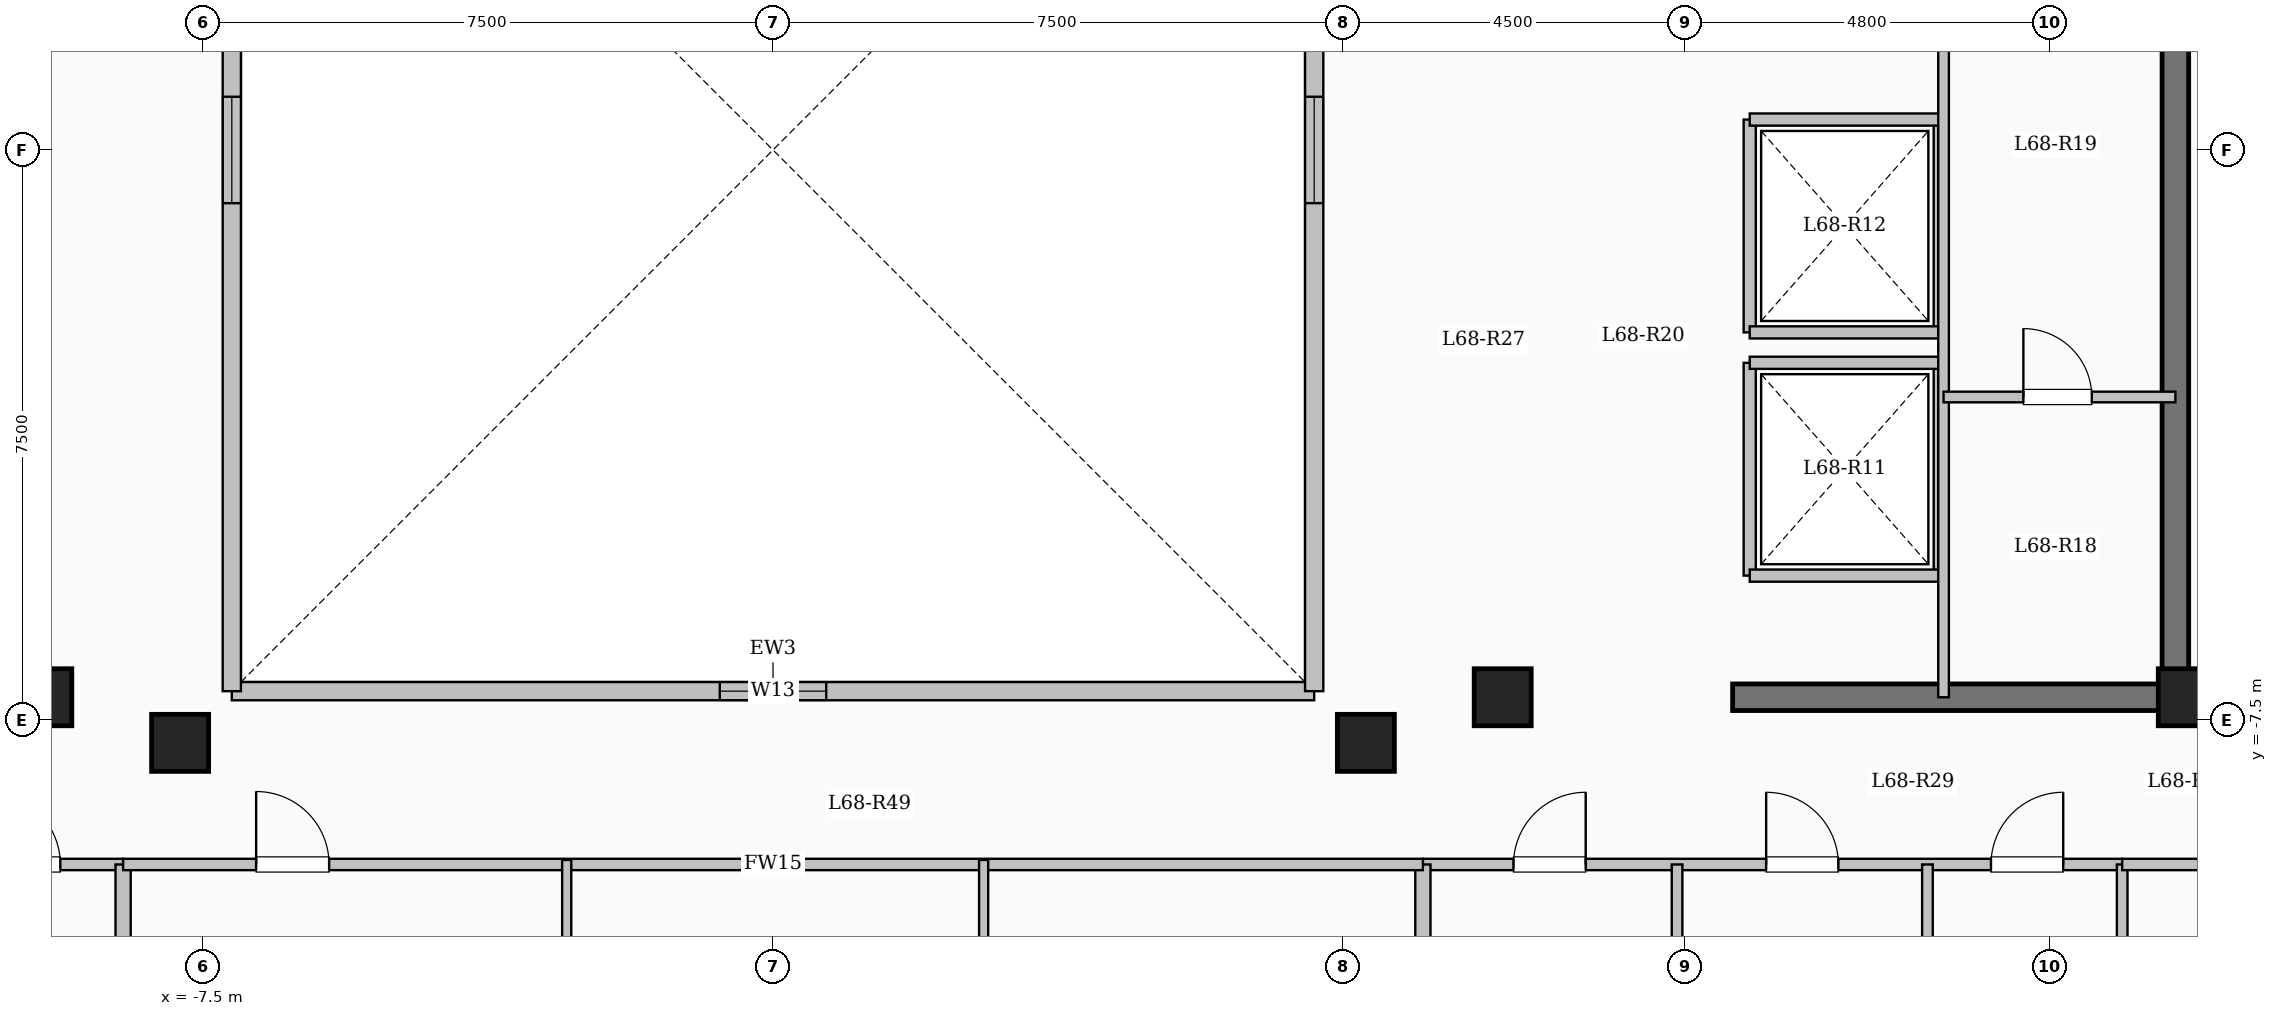
"""IFC4 building model, lengths in metres.
Left out: names, types, materials, properties, quantities, classifications, styles, units other than length and angle.
Written with IfcOpenShell. Run it as: python <this file> out.ifc"""

import sys

from ifc_helpers import new_model, si_unit, direction, frame, frame_2d, origin, origin_2d, place, context, subcontext, project, spatial, rectangle, extrude, element, fill, save


model = new_model("IFC4")
c1 = context("Model", 3, precision=1e-05, world=origin(), true_north=direction((0.0, 1.0)))
c2 = subcontext(c1, "Body", "Model", "MODEL_VIEW")
j1 = project(units=[si_unit("LENGTHUNIT", "METRE"), si_unit("PLANEANGLEUNIT", "RADIAN")], contexts=[c1])
p1 = place(None, origin())
s1 = spatial("IfcSite", under=j1, at=p1, CompositionType="ELEMENT")
p2 = place(p1, origin())
s2 = spatial("IfcBuilding", under=s1, at=p2, CompositionType="ELEMENT")
p3 = place(p2, frame((0.0, 0.0, 251.55)))
s3 = spatial("IfcBuildingStorey", under=s2, at=p3, CompositionType="ELEMENT", Elevation=251.55)
for number, where, z_axis, x_axis in (
    (1, (-7.8, -7.8, 0.0), (0.0, 0.0, 1.0), (1.0, 0.0, 0.0)),
    (2, (7.8, -7.8, 0.0), (0.0, 0.0, 1.0), (1.0, 0.0, 0.0)),
    (3, (-9.6, -7.2, 0.0), (0.0, 0.0, 1.0), (1.0, 0.0, 0.0)),
    (4, (9.6, -7.2, 0.0), (0.0, 0.0, 1.0), (1.0, 0.0, 0.0)),
    (5, (18.6, -7.2, 0.0), (0.0, 0.0, 1.0), (1.0, 0.0, 0.0)),
):
    element("IfcColumn", number, at=place(p3, frame(where, z_axis=z_axis, x_axis=x_axis)), inside=s3, PredefinedType="COLUMN", context=c2, shape_type="SweptSolid", body=[
        extrude(rectangle(XDim=0.75, YDim=0.75, at=origin_2d()), origin(), (0.0, 0.0, 1.0), 3.35),
    ])
p4 = place(p3, frame((-7.12, -7.12, 0.0), z_axis=(0.0, 0.0, 1.0), x_axis=(1.0, 0.0, 0.0)))
e6 = element("IfcWall", 6, at=p4, inside=s3, PredefinedType="SOLIDWALL", context=c2, shape_type="SweptSolid", body=[
    extrude(rectangle(XDim=14.24, YDim=0.24, at=frame_2d((7.12, 0.0))), origin(), (0.0, 0.0, 1.0), 3.1),
])
p5 = place(p4, frame((6.42, 0.0, 0.95)))
e7 = element("IfcOpeningElement", 7, at=p5, cuts=e6, PredefinedType="OPENING", context=c2, shape_type="SweptSolid", body=[
    extrude(rectangle(XDim=1.4, YDim=1.5, at=frame_2d((0.7, 0.75))), frame((0.0, 0.13, 0.0), z_axis=(0.0, -1.0, 0.0), x_axis=(1.0, 0.0, 0.0)), (0.0, 0.0, 1.0), 0.26),
])
p6 = place(p3, frame((7.12, -7.12, 0.0), z_axis=(0.0, 0.0, 1.0), x_axis=(0.0, 1.0, 0.0)))
e8 = element("IfcWall", 8, at=p6, inside=s3, PredefinedType="SOLIDWALL", context=c2, shape_type="SweptSolid", body=[
    extrude(rectangle(XDim=14.24, YDim=0.24, at=frame_2d((7.12, 0.0))), origin(), (0.0, 0.0, 1.0), 3.1),
])
p7 = place(p6, frame((6.42, 0.0, 0.95)))
e9 = element("IfcOpeningElement", 9, at=p7, cuts=e8, PredefinedType="OPENING", context=c2, shape_type="SweptSolid", body=[
    extrude(rectangle(XDim=1.4, YDim=1.5, at=frame_2d((0.7, 0.75))), frame((0.0, 0.13, 0.0), z_axis=(0.0, -1.0, 0.0), x_axis=(1.0, 0.0, 0.0)), (0.0, 0.0, 1.0), 0.26),
])
p8 = place(p3, frame((-7.12, 7.12, 0.0), z_axis=(0.0, 0.0, 1.0), x_axis=(0.0, -1.0, 0.0)))
e10 = element("IfcWall", 10, at=p8, inside=s3, PredefinedType="SOLIDWALL", context=c2, shape_type="SweptSolid", body=[
    extrude(rectangle(XDim=14.24, YDim=0.24, at=frame_2d((7.12, 0.0))), origin(), (0.0, 0.0, 1.0), 3.1),
])
p9 = place(p8, frame((6.42, 0.0, 0.95)))
e11 = element("IfcOpeningElement", 11, at=p9, cuts=e10, PredefinedType="OPENING", context=c2, shape_type="SweptSolid", body=[
    extrude(rectangle(XDim=1.4, YDim=1.5, at=frame_2d((0.7, 0.75))), frame((0.0, 0.13, 0.0), z_axis=(0.0, -1.0, 0.0), x_axis=(1.0, 0.0, 0.0)), (0.0, 0.0, 1.0), 0.26),
])
for number, where, z_axis, x_axis in (
    (12, (12.85, -5.6, 0.0), (0.0, 0.0, 1.0), (0.0, 1.0, 0.0)),
    (13, (15.35, -5.6, 0.0), (0.0, 0.0, 1.0), (0.0, 1.0, 0.0)),
):
    element("IfcWall", number, at=place(p3, frame(where, z_axis=z_axis, x_axis=x_axis)), inside=s3, PredefinedType="SOLIDWALL", context=c2, shape_type="SweptSolid", body=[
        extrude(rectangle(XDim=2.8, YDim=0.16, at=frame_2d((1.4, 0.0))), origin(), (0.0, 0.0, 1.0), 3.1),
    ])
for number, where, z_axis, x_axis in (
    (14, (12.85, -5.6, 0.0), (0.0, 0.0, 1.0), (1.0, 0.0, 0.0)),
    (15, (12.85, -2.8, 0.0), (0.0, 0.0, 1.0), (1.0, 0.0, 0.0)),
):
    element("IfcWall", number, at=place(p3, frame(where, z_axis=z_axis, x_axis=x_axis)), inside=s3, PredefinedType="SOLIDWALL", context=c2, shape_type="SweptSolid", body=[
        extrude(rectangle(XDim=2.5, YDim=0.16, at=frame_2d((1.25, 0.0))), origin(), (0.0, 0.0, 1.0), 3.1),
    ])
for number, where, z_axis, x_axis in (
    (16, (12.85, -2.4, 0.0), (0.0, 0.0, 1.0), (0.0, 1.0, 0.0)),
    (17, (15.35, -2.4, 0.0), (0.0, 0.0, 1.0), (0.0, 1.0, 0.0)),
):
    element("IfcWall", number, at=place(p3, frame(where, z_axis=z_axis, x_axis=x_axis)), inside=s3, PredefinedType="SOLIDWALL", context=c2, shape_type="SweptSolid", body=[
        extrude(rectangle(XDim=2.8, YDim=0.16, at=frame_2d((1.4, 0.0))), origin(), (0.0, 0.0, 1.0), 3.1),
    ])
for number, where, z_axis, x_axis in (
    (18, (12.85, -2.4, 0.0), (0.0, 0.0, 1.0), (1.0, 0.0, 0.0)),
    (19, (12.85, 0.4, 0.0), (0.0, 0.0, 1.0), (1.0, 0.0, 0.0)),
):
    element("IfcWall", number, at=place(p3, frame(where, z_axis=z_axis, x_axis=x_axis)), inside=s3, PredefinedType="SOLIDWALL", context=c2, shape_type="SweptSolid", body=[
        extrude(rectangle(XDim=2.5, YDim=0.16, at=frame_2d((1.25, 0.0))), origin(), (0.0, 0.0, 1.0), 3.1),
    ])
p10 = place(p3, frame((18.45, -7.375, 0.0), z_axis=(0.0, 0.0, 1.0), x_axis=(0.0, 1.0, 0.0)))
e20 = element("IfcWall", 20, at=p10, inside=s3, PredefinedType="SHEAR", context=c2, shape_type="SweptSolid", body=[
    extrude(rectangle(XDim=14.05, YDim=0.35, at=frame_2d((7.025, 0.0))), origin(), (0.0, 0.0, 1.0), 3.35),
])
p11 = place(p3, frame((12.625, -7.2, 0.0), z_axis=(0.0, 0.0, 1.0), x_axis=(1.0, 0.0, 0.0)))
e21 = element("IfcWall", 21, at=p11, inside=s3, PredefinedType="SHEAR", context=c2, shape_type="SweptSolid", body=[
    extrude(rectangle(XDim=6.0, YDim=0.35, at=frame_2d((3.0, 0.0))), origin(), (0.0, 0.0, 1.0), 3.35),
])
p12 = place(p3, frame((15.4, -7.2, 0.0), z_axis=(0.0, 0.0, 1.0), x_axis=(0.0, 1.0, 0.0)))
e22 = element("IfcWall", 22, at=p12, inside=s3, PredefinedType="PARTITIONING", context=c2, shape_type="SweptSolid", body=[
    extrude(rectangle(XDim=10.45, YDim=0.14, at=frame_2d((5.225, 0.0))), origin(), (0.0, 0.0, 1.0), 3.1),
])
p13 = place(p12, frame((9.25, 0.0, 0.0)))
e23 = element("IfcOpeningElement", 23, at=p13, cuts=e22, PredefinedType="OPENING", context=c2, shape_type="SweptSolid", body=[
    extrude(rectangle(XDim=0.9, YDim=2.08, at=frame_2d((0.45, 1.04))), frame((0.0, 0.08, 0.0), z_axis=(0.0, -1.0, 0.0), x_axis=(1.0, 0.0, 0.0)), (0.0, 0.0, 1.0), 0.16),
])
p14 = place(p3, frame((15.4, -3.25, 0.0), z_axis=(0.0, 0.0, 1.0), x_axis=(1.0, 0.0, 0.0)))
e24 = element("IfcWall", 24, at=p14, inside=s3, PredefinedType="PARTITIONING", context=c2, shape_type="SweptSolid", body=[
    extrude(rectangle(XDim=3.05, YDim=0.14, at=frame_2d((1.525, 0.0))), origin(), (0.0, 0.0, 1.0), 3.1),
])
p15 = place(p14, frame((1.05, 0.0, 0.0)))
e25 = element("IfcOpeningElement", 25, at=p15, cuts=e24, PredefinedType="OPENING", context=c2, shape_type="SweptSolid", body=[
    extrude(rectangle(XDim=0.9, YDim=2.08, at=frame_2d((0.45, 1.04))), frame((0.0, 0.08, 0.0), z_axis=(0.0, -1.0, 0.0), x_axis=(1.0, 0.0, 0.0)), (0.0, 0.0, 1.0), 0.16),
])
p16 = place(p3, frame((-17.75, -9.4, 0.0), z_axis=(0.0, 0.0, 1.0), x_axis=(1.0, 0.0, 0.0)))
e26 = element("IfcWall", 26, at=p16, inside=s3, PredefinedType="PARTITIONING", context=c2, shape_type="SweptSolid", body=[
    extrude(rectangle(XDim=9.2, YDim=0.15, at=frame_2d((4.6, 0.0))), origin(), (0.0, 0.0, 1.0), 3.1),
])
p17 = place(p16, frame((1.142, 0.0, 0.0)))
e27 = element("IfcOpeningElement", 27, at=p17, cuts=e26, PredefinedType="OPENING", context=c2, shape_type="SweptSolid", body=[
    extrude(rectangle(XDim=0.95, YDim=2.15, at=frame_2d((0.475, 1.075))), frame((0.0, 0.085, 0.0), z_axis=(0.0, -1.0, 0.0), x_axis=(1.0, 0.0, 0.0)), (0.0, 0.0, 1.0), 0.17),
])
p18 = place(p16, frame((4.466, 0.0, 0.0)))
e28 = element("IfcOpeningElement", 28, at=p18, cuts=e26, PredefinedType="OPENING", context=c2, shape_type="SweptSolid", body=[
    extrude(rectangle(XDim=0.95, YDim=2.15, at=frame_2d((0.475, 1.075))), frame((0.0, 0.085, 0.0), z_axis=(0.0, -1.0, 0.0), x_axis=(1.0, 0.0, 0.0)), (0.0, 0.0, 1.0), 0.17),
])
p19 = place(p16, frame((7.424, 0.0, 0.0)))
e29 = element("IfcOpeningElement", 29, at=p19, cuts=e26, PredefinedType="OPENING", context=c2, shape_type="SweptSolid", body=[
    extrude(rectangle(XDim=0.95, YDim=2.15, at=frame_2d((0.475, 1.075))), frame((0.0, 0.085, 0.0), z_axis=(0.0, -1.0, 0.0), x_axis=(1.0, 0.0, 0.0)), (0.0, 0.0, 1.0), 0.17),
])
p20 = place(p3, frame((8.55, -9.4, 0.0), z_axis=(0.0, 0.0, 1.0), x_axis=(1.0, 0.0, 0.0)))
e30 = element("IfcWall", 30, at=p20, inside=s3, PredefinedType="PARTITIONING", context=c2, shape_type="SweptSolid", body=[
    extrude(rectangle(XDim=9.2, YDim=0.15, at=frame_2d((4.6, 0.0))), origin(), (0.0, 0.0, 1.0), 3.1),
])
p21 = place(p20, frame((1.192, 0.0, 0.0)))
e31 = element("IfcOpeningElement", 31, at=p21, cuts=e30, PredefinedType="OPENING", context=c2, shape_type="SweptSolid", body=[
    extrude(rectangle(XDim=0.95, YDim=2.15, at=frame_2d((0.475, 1.075))), frame((0.0, 0.085, 0.0), z_axis=(0.0, -1.0, 0.0), x_axis=(1.0, 0.0, 0.0)), (0.0, 0.0, 1.0), 0.17),
])
p22 = place(p20, frame((4.516, 0.0, 0.0)))
e32 = element("IfcOpeningElement", 32, at=p22, cuts=e30, PredefinedType="OPENING", context=c2, shape_type="SweptSolid", body=[
    extrude(rectangle(XDim=0.95, YDim=2.15, at=frame_2d((0.475, 1.075))), frame((0.0, 0.085, 0.0), z_axis=(0.0, -1.0, 0.0), x_axis=(1.0, 0.0, 0.0)), (0.0, 0.0, 1.0), 0.17),
])
p23 = place(p20, frame((7.474, 0.0, 0.0)))
e33 = element("IfcOpeningElement", 33, at=p23, cuts=e30, PredefinedType="OPENING", context=c2, shape_type="SweptSolid", body=[
    extrude(rectangle(XDim=0.95, YDim=2.15, at=frame_2d((0.475, 1.075))), frame((0.0, 0.085, 0.0), z_axis=(0.0, -1.0, 0.0), x_axis=(1.0, 0.0, 0.0)), (0.0, 0.0, 1.0), 0.17),
])
p24 = place(p3, frame((11.894, -20.85, 0.0), z_axis=(0.0, 0.0, 1.0), x_axis=(0.0, 1.0, 0.0)))
e34 = element("IfcWall", 34, at=p24, inside=s3, PredefinedType="PARTITIONING", context=c2, shape_type="SweptSolid", body=[
    extrude(rectangle(XDim=11.45, YDim=0.14, at=frame_2d((5.725, 0.0))), origin(), (0.0, 0.0, 1.0), 3.1),
])
p25 = place(p3, frame((15.188, -20.85, 0.0), z_axis=(0.0, 0.0, 1.0), x_axis=(0.0, 1.0, 0.0)))
e35 = element("IfcWall", 35, at=p25, inside=s3, PredefinedType="PARTITIONING", context=c2, shape_type="SweptSolid", body=[
    extrude(rectangle(XDim=11.45, YDim=0.14, at=frame_2d((5.725, 0.0))), origin(), (0.0, 0.0, 1.0), 2.685),
])
for number, where, z_axis, x_axis in (
    (36, (-8.55, -21.504, 0.0), (0.0, 0.0, 1.0), (0.0, 1.0, 0.0)),
    (37, (8.55, -21.504, 0.0), (0.0, 0.0, 1.0), (0.0, 1.0, 0.0)),
):
    element("IfcWall", number, at=place(p3, frame(where, z_axis=z_axis, x_axis=x_axis)), inside=s3, PredefinedType="SOLIDWALL", context=c2, shape_type="SweptSolid", body=[
        extrude(rectangle(XDim=12.104, YDim=0.2, at=frame_2d((6.052, 0.0))), origin(), (0.0, 0.0, 1.0), 3.1),
    ])
p26 = place(p3, frame((-8.55, -9.4, 0.0), z_axis=(0.0, 0.0, 1.0), x_axis=(1.0, 0.0, 0.0)))
e38 = element("IfcWall", 38, at=p26, inside=s3, PredefinedType="PARTITIONING", context=c2, shape_type="SweptSolid", body=[
    extrude(rectangle(XDim=17.1, YDim=0.15, at=frame_2d((8.55, 0.0))), origin(), (0.0, 0.0, 1.0), 3.1),
])
p27 = place(p26, frame((1.75, 0.0, 0.0)))
e39 = element("IfcOpeningElement", 39, at=p27, cuts=e38, PredefinedType="OPENING", context=c2, shape_type="SweptSolid", body=[
    extrude(rectangle(XDim=0.96, YDim=2.15, at=frame_2d((0.48, 1.075))), frame((0.0, 0.085, 0.0), z_axis=(0.0, -1.0, 0.0), x_axis=(1.0, 0.0, 0.0)), (0.0, 0.0, 1.0), 0.17),
])
p28 = place(p3, frame((-2.714, -22.38, 0.0), z_axis=(0.0, 0.0, 1.0), x_axis=(0.0, 1.0, 0.0)))
e40 = element("IfcWall", 40, at=p28, inside=s3, PredefinedType="PARTITIONING", context=c2, shape_type="SweptSolid", body=[
    extrude(rectangle(XDim=13.04, YDim=0.12, at=frame_2d((6.52, 0.0))), origin(), (0.0, 0.0, 1.0), 3.1),
])
p29 = place(p28, frame((8.705, 0.0, 0.0)))
e41 = element("IfcOpeningElement", 41, at=p29, cuts=e40, PredefinedType="OPENING", context=c2, shape_type="SweptSolid", body=[
    extrude(rectangle(XDim=1.08, YDim=2.15, at=frame_2d((0.54, 1.075))), frame((0.0, 0.07, 0.0), z_axis=(0.0, -1.0, 0.0), x_axis=(1.0, 0.0, 0.0)), (0.0, 0.0, 1.0), 0.14),
])
p30 = place(p3, frame((2.771, -12.31, 0.0), z_axis=(0.0, 0.0, 1.0), x_axis=(0.0, 1.0, 0.0)))
e42 = element("IfcWall", 42, at=p30, inside=s3, PredefinedType="PARTITIONING", context=c2, shape_type="SweptSolid", body=[
    extrude(rectangle(XDim=2.97, YDim=0.12, at=frame_2d((1.485, 0.0))), origin(), (0.0, 0.0, 1.0), 3.1),
])
p31 = place(p3, frame((18.45, -7.25, 0.0), z_axis=(0.0, 0.0, 1.0), x_axis=(1.0, 0.0, 0.0)))
e43 = element("IfcWall", 43, at=p31, inside=s3, PredefinedType="PARTITIONING", context=c2, shape_type="SweptSolid", body=[
    extrude(rectangle(XDim=4.23, YDim=0.15, at=frame_2d((2.115, 0.0))), origin(), (0.0, 0.0, 1.0), 3.1),
])
p32 = place(p31, frame((1.5, 0.0, 0.0)))
e44 = element("IfcOpeningElement", 44, at=p32, cuts=e43, PredefinedType="OPENING", context=c2, shape_type="SweptSolid", body=[
    extrude(rectangle(XDim=1.08, YDim=2.15, at=frame_2d((0.54, 1.075))), frame((0.0, 0.085, 0.0), z_axis=(0.0, -1.0, 0.0), x_axis=(1.0, 0.0, 0.0)), (0.0, 0.0, 1.0), 0.17),
])
p33 = place(p3, frame((17.75, -17.55, 0.0), z_axis=(0.0, 0.0, 1.0), x_axis=(0.0, 1.0, 0.0)))
e45 = element("IfcWall", 45, at=p33, inside=s3, PredefinedType="PARTITIONING", context=c2, shape_type="SweptSolid", body=[
    extrude(rectangle(XDim=8.15, YDim=0.14, at=frame_2d((4.075, 0.0))), origin(), (0.0, 0.0, 1.0), 3.1),
])
p34 = place(p3, frame((17.75, -9.4, 0.0), z_axis=(0.0, 0.0, 1.0), x_axis=(1.0, 0.0, 0.0)))
e46 = element("IfcWall", 46, at=p34, inside=s3, PredefinedType="PARTITIONING", context=c2, shape_type="SweptSolid", body=[
    extrude(rectangle(XDim=4.93, YDim=0.15, at=frame_2d((2.465, 0.0))), origin(), (0.0, 0.0, 1.0), 3.1),
])
p35 = place(p34, frame((1.99, 0.0, 0.0)))
e47 = element("IfcOpeningElement", 47, at=p35, cuts=e46, PredefinedType="OPENING", context=c2, shape_type="SweptSolid", body=[
    extrude(rectangle(XDim=0.95, YDim=2.15, at=frame_2d((0.475, 1.075))), frame((0.0, 0.085, 0.0), z_axis=(0.0, -1.0, 0.0), x_axis=(1.0, 0.0, 0.0)), (0.0, 0.0, 1.0), 0.17),
])
p36 = place(p5, origin())
e48 = element("IfcWindow", 48, at=p36, inside=s3, PartitioningType="SINGLE_PANEL", PredefinedType="WINDOW", context=c2, shape_type="SweptSolid", body=[
    extrude(rectangle(XDim=1.4, YDim=1.5, at=frame_2d((0.7, 0.75))), frame((0.0, 0.03, 0.0), z_axis=(0.0, -1.0, 0.0), x_axis=(1.0, 0.0, 0.0)), (0.0, 0.0, 1.0), 0.06),
])
fill(e7, e48)
p37 = place(p7, origin())
e49 = element("IfcWindow", 49, at=p37, inside=s3, PartitioningType="SINGLE_PANEL", PredefinedType="WINDOW", context=c2, shape_type="SweptSolid", body=[
    extrude(rectangle(XDim=1.4, YDim=1.5, at=frame_2d((0.7, 0.75))), frame((0.0, 0.03, 0.0), z_axis=(0.0, -1.0, 0.0), x_axis=(1.0, 0.0, 0.0)), (0.0, 0.0, 1.0), 0.06),
])
fill(e9, e49)
p38 = place(p9, origin())
e50 = element("IfcWindow", 50, at=p38, inside=s3, PartitioningType="SINGLE_PANEL", PredefinedType="WINDOW", context=c2, shape_type="SweptSolid", body=[
    extrude(rectangle(XDim=1.4, YDim=1.5, at=frame_2d((0.7, 0.75))), frame((0.0, 0.03, 0.0), z_axis=(0.0, -1.0, 0.0), x_axis=(1.0, 0.0, 0.0)), (0.0, 0.0, 1.0), 0.06),
])
fill(e11, e50)
p39 = place(p15, origin())
e51 = element("IfcDoor", 51, at=p39, inside=s3, OperationType="SINGLE_SWING_LEFT", PredefinedType="DOOR", context=c2, shape_type="SweptSolid", body=[
    extrude(rectangle(XDim=0.9, YDim=2.08, at=frame_2d((0.45, 1.04))), frame((0.0, 0.025, 0.0), z_axis=(0.0, -1.0, 0.0), x_axis=(1.0, 0.0, 0.0)), (0.0, 0.0, 1.0), 0.05),
])
fill(e25, e51)
p40 = place(p19, origin())
e52 = element("IfcDoor", 52, at=p40, inside=s3, OperationType="SINGLE_SWING_LEFT", PredefinedType="DOOR", context=c2, shape_type="SweptSolid", body=[
    extrude(rectangle(XDim=0.95, YDim=2.15, at=frame_2d((0.475, 1.075))), frame((0.0, 0.025, 0.0), z_axis=(0.0, -1.0, 0.0), x_axis=(1.0, 0.0, 0.0)), (0.0, 0.0, 1.0), 0.05),
])
fill(e29, e52)
p41 = place(p21, origin())
e53 = element("IfcDoor", 53, at=p41, inside=s3, OperationType="SINGLE_SWING_RIGHT", PredefinedType="DOOR", context=c2, shape_type="SweptSolid", body=[
    extrude(rectangle(XDim=0.95, YDim=2.15, at=frame_2d((0.475, 1.075))), frame((0.0, 0.025, 0.0), z_axis=(0.0, -1.0, 0.0), x_axis=(1.0, 0.0, 0.0)), (0.0, 0.0, 1.0), 0.05),
])
fill(e31, e53)
p42 = place(p22, origin())
e54 = element("IfcDoor", 54, at=p42, inside=s3, OperationType="SINGLE_SWING_LEFT", PredefinedType="DOOR", context=c2, shape_type="SweptSolid", body=[
    extrude(rectangle(XDim=0.95, YDim=2.15, at=frame_2d((0.475, 1.075))), frame((0.0, 0.025, 0.0), z_axis=(0.0, -1.0, 0.0), x_axis=(1.0, 0.0, 0.0)), (0.0, 0.0, 1.0), 0.05),
])
fill(e32, e54)
p43 = place(p23, origin())
e55 = element("IfcDoor", 55, at=p43, inside=s3, OperationType="SINGLE_SWING_RIGHT", PredefinedType="DOOR", context=c2, shape_type="SweptSolid", body=[
    extrude(rectangle(XDim=0.95, YDim=2.15, at=frame_2d((0.475, 1.075))), frame((0.0, 0.025, 0.0), z_axis=(0.0, -1.0, 0.0), x_axis=(1.0, 0.0, 0.0)), (0.0, 0.0, 1.0), 0.05),
])
fill(e33, e55)
p44 = place(p27, origin())
e56 = element("IfcDoor", 56, at=p44, inside=s3, OperationType="SINGLE_SWING_LEFT", PredefinedType="DOOR", context=c2, shape_type="SweptSolid", body=[
    extrude(rectangle(XDim=0.96, YDim=2.15, at=frame_2d((0.48, 1.075))), frame((0.0, 0.025, 0.0), z_axis=(0.0, -1.0, 0.0), x_axis=(1.0, 0.0, 0.0)), (0.0, 0.0, 1.0), 0.05),
])
fill(e39, e56)
save(model, sys.argv[1])
